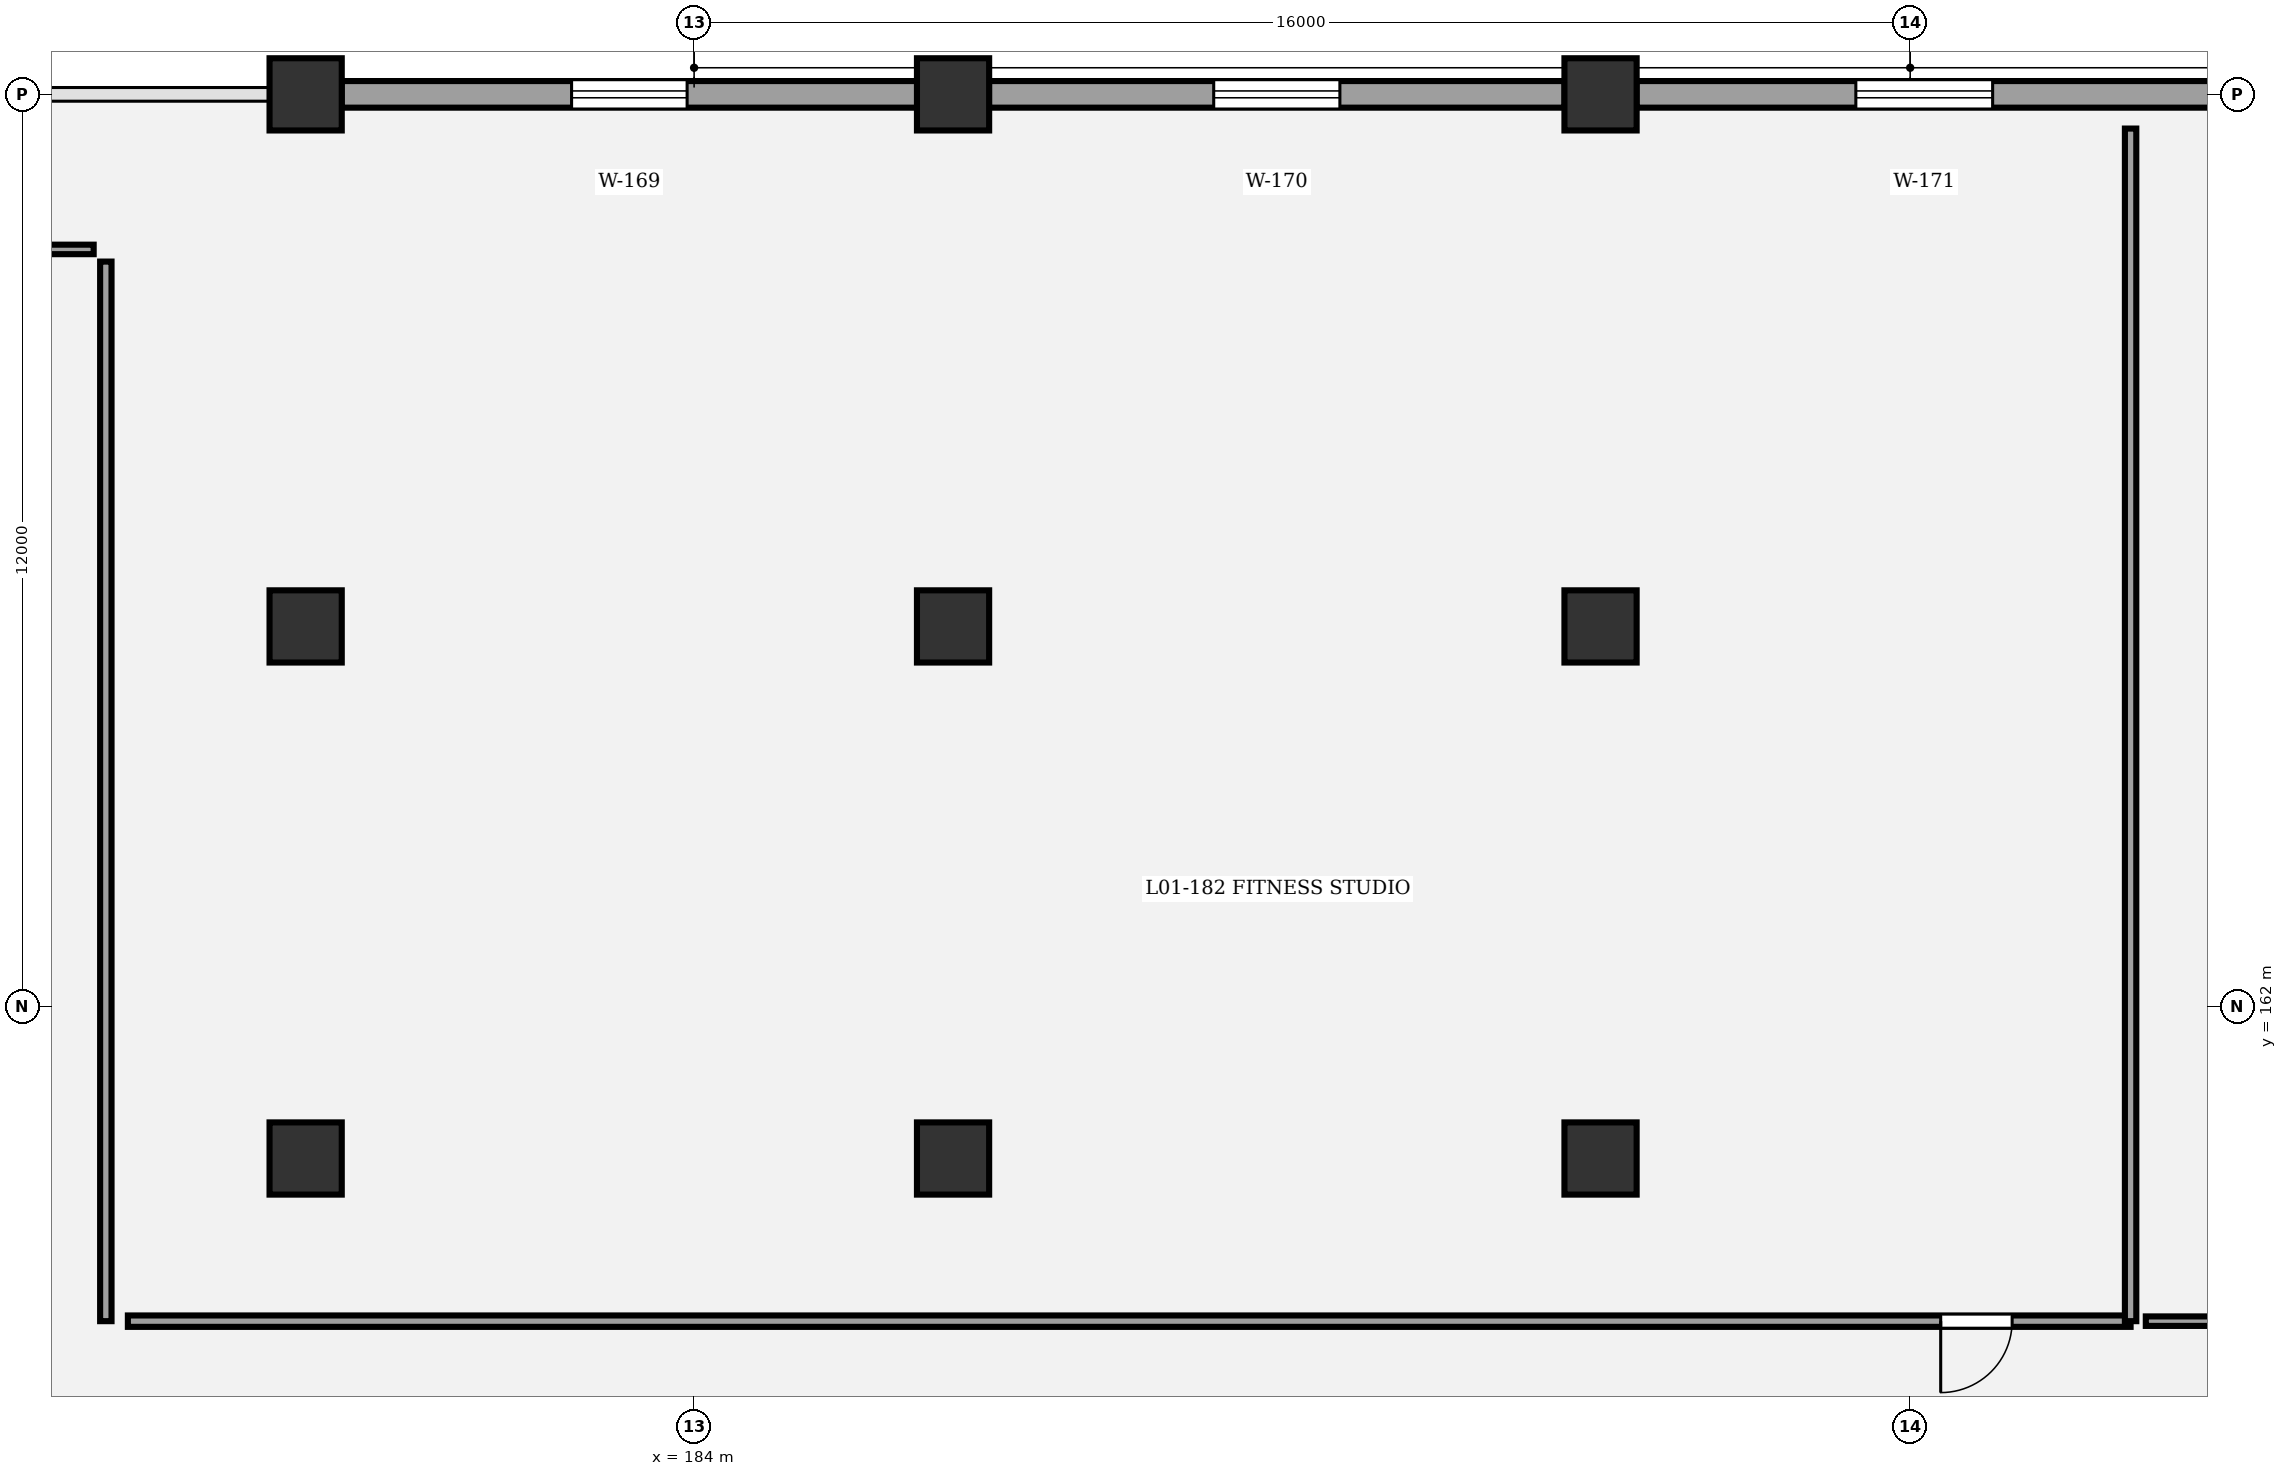
"""IFC4 building model, lengths in metres.
Left out: names, types, materials, properties, quantities, classifications, styles, units other than length and angle.
Written with IfcOpenShell. Run it as: python <this file> out.ifc"""

import sys

from ifc_helpers import new_model, si_unit, direction, frame, frame_2d, origin, origin_2d, place, context, subcontext, project, spatial, rectangle, circle, extrude, element, fill, save


model = new_model("IFC4")
c1 = context("Model", 3, precision=1e-05, world=origin(), true_north=direction((0.0, 1.0)))
c2 = subcontext(c1, "Body", "Model", "MODEL_VIEW")
j1 = project(units=[si_unit("LENGTHUNIT", "METRE"), si_unit("PLANEANGLEUNIT", "RADIAN")], contexts=[c1])
p1 = place(None, origin())
s1 = spatial("IfcSite", under=j1, at=p1, CompositionType="ELEMENT")
p2 = place(p1, origin())
s2 = spatial("IfcBuilding", under=s1, at=p2, CompositionType="ELEMENT")
p3 = place(p2, frame((0.0, 0.0, 5.4)))
s3 = spatial("IfcBuildingStorey", under=s2, at=p3, CompositionType="ELEMENT", Elevation=5.4)
for number, where, z_axis, x_axis in (
    (1, (178.889, 160.0, 0.0), (0.0, 0.0, 1.0), (1.0, 0.0, 0.0)),
    (2, (178.889, 167.0, 0.0), (0.0, 0.0, 1.0), (1.0, 0.0, 0.0)),
    (3, (178.889, 174.0, 0.0), (0.0, 0.0, 1.0), (1.0, 0.0, 0.0)),
    (4, (187.407, 160.0, 0.0), (0.0, 0.0, 1.0), (1.0, 0.0, 0.0)),
    (5, (187.407, 167.0, 0.0), (0.0, 0.0, 1.0), (1.0, 0.0, 0.0)),
    (6, (187.407, 174.0, 0.0), (0.0, 0.0, 1.0), (1.0, 0.0, 0.0)),
    (7, (195.926, 160.0, 0.0), (0.0, 0.0, 1.0), (1.0, 0.0, 0.0)),
    (8, (195.926, 167.0, 0.0), (0.0, 0.0, 1.0), (1.0, 0.0, 0.0)),
    (9, (195.926, 174.0, 0.0), (0.0, 0.0, 1.0), (1.0, 0.0, 0.0)),
):
    element("IfcColumn", number, at=place(p3, frame(where, z_axis=z_axis, x_axis=x_axis)), inside=s3, PredefinedType="COLUMN", context=c2, shape_type="SweptSolid", body=[
        extrude(circle(Radius=0.475, at=origin_2d()), origin(), (0.0, 0.0, 1.0), 4.8),
    ])
p4 = place(p3, frame((179.362, 174.0, 0.0), z_axis=(0.0, 0.0, 1.0), x_axis=(1.0, 0.0, 0.0)))
e10 = element("IfcWall", 10, at=p4, inside=s3, PredefinedType="STANDARD", context=c2, shape_type="SweptSolid", body=[
    extrude(rectangle(XDim=7.572, YDim=0.35, at=frame_2d((3.786, 0.0))), origin(), (0.0, 0.0, 1.0), 3.56),
])
p5 = place(p4, frame((3.026, 0.0, 0.9)))
e11 = element("IfcOpeningElement", 11, at=p5, cuts=e10, PredefinedType="OPENING", context=c2, shape_type="SweptSolid", body=[
    extrude(rectangle(XDim=1.52, YDim=2.15, at=frame_2d((0.76, 1.075))), frame((0.0, 0.185, 0.0), z_axis=(0.0, -1.0, 0.0), x_axis=(1.0, 0.0, 0.0)), (0.0, 0.0, 1.0), 0.37),
])
p6 = place(p3, frame((187.88, 174.0, 0.0), z_axis=(0.0, 0.0, 1.0), x_axis=(1.0, 0.0, 0.0)))
e12 = element("IfcWall", 12, at=p6, inside=s3, PredefinedType="STANDARD", context=c2, shape_type="SweptSolid", body=[
    extrude(rectangle(XDim=7.573, YDim=0.35, at=frame_2d((3.787, 0.0))), origin(), (0.0, 0.0, 1.0), 3.56),
])
p7 = place(p6, frame((2.957, 0.0, 0.9)))
e13 = element("IfcOpeningElement", 13, at=p7, cuts=e12, PredefinedType="OPENING", context=c2, shape_type="SweptSolid", body=[
    extrude(rectangle(XDim=1.66, YDim=2.15, at=frame_2d((0.83, 1.075))), frame((0.0, 0.185, 0.0), z_axis=(0.0, -1.0, 0.0), x_axis=(1.0, 0.0, 0.0)), (0.0, 0.0, 1.0), 0.37),
])
p8 = place(p3, frame((196.399, 174.0, 0.0), z_axis=(0.0, 0.0, 1.0), x_axis=(1.0, 0.0, 0.0)))
e14 = element("IfcWall", 14, at=p8, inside=s3, PredefinedType="STANDARD", context=c2, shape_type="SweptSolid", body=[
    extrude(rectangle(XDim=7.572, YDim=0.35, at=frame_2d((3.786, 0.0))), origin(), (0.0, 0.0, 1.0), 3.56),
])
p9 = place(p8, frame((2.886, 0.0, 0.9)))
e15 = element("IfcOpeningElement", 15, at=p9, cuts=e14, PredefinedType="OPENING", context=c2, shape_type="SweptSolid", body=[
    extrude(rectangle(XDim=1.8, YDim=2.15, at=frame_2d((0.9, 1.075))), frame((0.0, 0.185, 0.0), z_axis=(0.0, -1.0, 0.0), x_axis=(1.0, 0.0, 0.0)), (0.0, 0.0, 1.0), 0.37),
])
p10 = place(p3, frame((176.1, 171.96, 0.0), z_axis=(0.0, 0.0, 1.0), x_axis=(-1.0, 0.0, 0.0)))
e16 = element("IfcWall", 16, at=p10, inside=s3, PredefinedType="PARTITIONING", context=c2, shape_type="SweptSolid", body=[
    extrude(rectangle(XDim=26.1, YDim=0.125, at=frame_2d((13.05, 0.0))), origin(), (0.0, 0.0, 1.0), 3.55),
])
p11 = place(p10, frame((8.741, 0.0, 0.0)))
e17 = element("IfcOpeningElement", 17, at=p11, cuts=e16, PredefinedType="OPENING", context=c2, shape_type="SweptSolid", body=[
    extrude(rectangle(XDim=1.4, YDim=2.1, at=frame_2d((0.7, 1.05))), frame((0.0, 0.073, 0.0), z_axis=(0.0, -1.0, 0.0), x_axis=(1.0, 0.0, 0.0)), (0.0, 0.0, 1.0), 0.145),
])
p12 = place(p3, frame((202.9, 157.86, 0.0), z_axis=(0.0, 0.0, 1.0), x_axis=(-1.0, 0.0, 0.0)))
e18 = element("IfcWall", 18, at=p12, inside=s3, PredefinedType="PARTITIONING", context=c2, shape_type="SweptSolid", body=[
    extrude(rectangle(XDim=26.35, YDim=0.15, at=frame_2d((13.175, 0.0))), origin(), (0.0, 0.0, 1.0), 3.55),
])
p13 = place(p12, frame((1.559, 0.0, 0.0)))
e19 = element("IfcOpeningElement", 19, at=p13, cuts=e18, PredefinedType="OPENING", context=c2, shape_type="SweptSolid", body=[
    extrude(rectangle(XDim=0.94, YDim=2.2, at=frame_2d((0.47, 1.1))), frame((0.0, 0.085, 0.0), z_axis=(0.0, -1.0, 0.0), x_axis=(1.0, 0.0, 0.0)), (0.0, 0.0, 1.0), 0.17),
])
p14 = place(p3, frame((216.5, 157.86, 0.0), z_axis=(0.0, 0.0, 1.0), x_axis=(-1.0, 0.0, 0.0)))
e20 = element("IfcWall", 20, at=p14, inside=s3, PredefinedType="PARTITIONING", context=c2, shape_type="SweptSolid", body=[
    extrude(rectangle(XDim=13.4, YDim=0.125, at=frame_2d((6.7, 0.0))), origin(), (0.0, 0.0, 1.0), 3.55),
])
p15 = place(p14, frame((7.977, 0.0, 0.0)))
e21 = element("IfcOpeningElement", 21, at=p15, cuts=e20, PredefinedType="OPENING", context=c2, shape_type="SweptSolid", body=[
    extrude(rectangle(XDim=0.98, YDim=2.2, at=frame_2d((0.49, 1.1))), frame((0.0, 0.073, 0.0), z_axis=(0.0, -1.0, 0.0), x_axis=(1.0, 0.0, 0.0)), (0.0, 0.0, 1.0), 0.145),
])
p16 = place(p3, frame((176.26, 157.86, 0.0), z_axis=(0.0, 0.0, 1.0), x_axis=(0.0, 1.0, 0.0)))
e22 = element("IfcWall", 22, at=p16, inside=s3, PredefinedType="PARTITIONING", context=c2, shape_type="SweptSolid", body=[
    extrude(rectangle(XDim=13.94, YDim=0.15, at=frame_2d((6.97, 0.0))), origin(), (0.0, 0.0, 1.0), 3.55),
])
p17 = place(p3, frame((202.9, 173.55, 0.0), z_axis=(0.0, 0.0, 1.0), x_axis=(0.0, -1.0, 0.0)))
e23 = element("IfcWall", 23, at=p17, inside=s3, PredefinedType="PARTITIONING", context=c2, shape_type="SweptSolid", body=[
    extrude(rectangle(XDim=15.69, YDim=0.15, at=frame_2d((7.845, 0.0))), origin(), (0.0, 0.0, 1.0), 3.55),
])
p18 = place(p5, origin())
e24 = element("IfcWindow", 24, at=p18, inside=s3, PartitioningType="SINGLE_PANEL", PredefinedType="WINDOW", context=c2, shape_type="SweptSolid", body=[
    extrude(rectangle(XDim=1.52, YDim=2.15, at=frame_2d((0.76, 1.075))), frame((0.0, 0.03, 0.0), z_axis=(0.0, -1.0, 0.0), x_axis=(1.0, 0.0, 0.0)), (0.0, 0.0, 1.0), 0.06),
])
fill(e11, e24)
p19 = place(p7, origin())
e25 = element("IfcWindow", 25, at=p19, inside=s3, PartitioningType="SINGLE_PANEL", PredefinedType="WINDOW", context=c2, shape_type="SweptSolid", body=[
    extrude(rectangle(XDim=1.66, YDim=2.15, at=frame_2d((0.83, 1.075))), frame((0.0, 0.03, 0.0), z_axis=(0.0, -1.0, 0.0), x_axis=(1.0, 0.0, 0.0)), (0.0, 0.0, 1.0), 0.06),
])
fill(e13, e25)
p20 = place(p9, origin())
e26 = element("IfcWindow", 26, at=p20, inside=s3, PartitioningType="SINGLE_PANEL", PredefinedType="WINDOW", context=c2, shape_type="SweptSolid", body=[
    extrude(rectangle(XDim=1.8, YDim=2.15, at=frame_2d((0.9, 1.075))), frame((0.0, 0.03, 0.0), z_axis=(0.0, -1.0, 0.0), x_axis=(1.0, 0.0, 0.0)), (0.0, 0.0, 1.0), 0.06),
])
fill(e15, e26)
p21 = place(p13, origin())
e27 = element("IfcDoor", 27, at=p21, inside=s3, OperationType="SINGLE_SWING_RIGHT", PredefinedType="DOOR", context=c2, shape_type="SweptSolid", body=[
    extrude(rectangle(XDim=0.94, YDim=2.2, at=frame_2d((0.47, 1.1))), frame((0.0, 0.025, 0.0), z_axis=(0.0, -1.0, 0.0), x_axis=(1.0, 0.0, 0.0)), (0.0, 0.0, 1.0), 0.05),
])
fill(e19, e27)
save(model, sys.argv[1])
